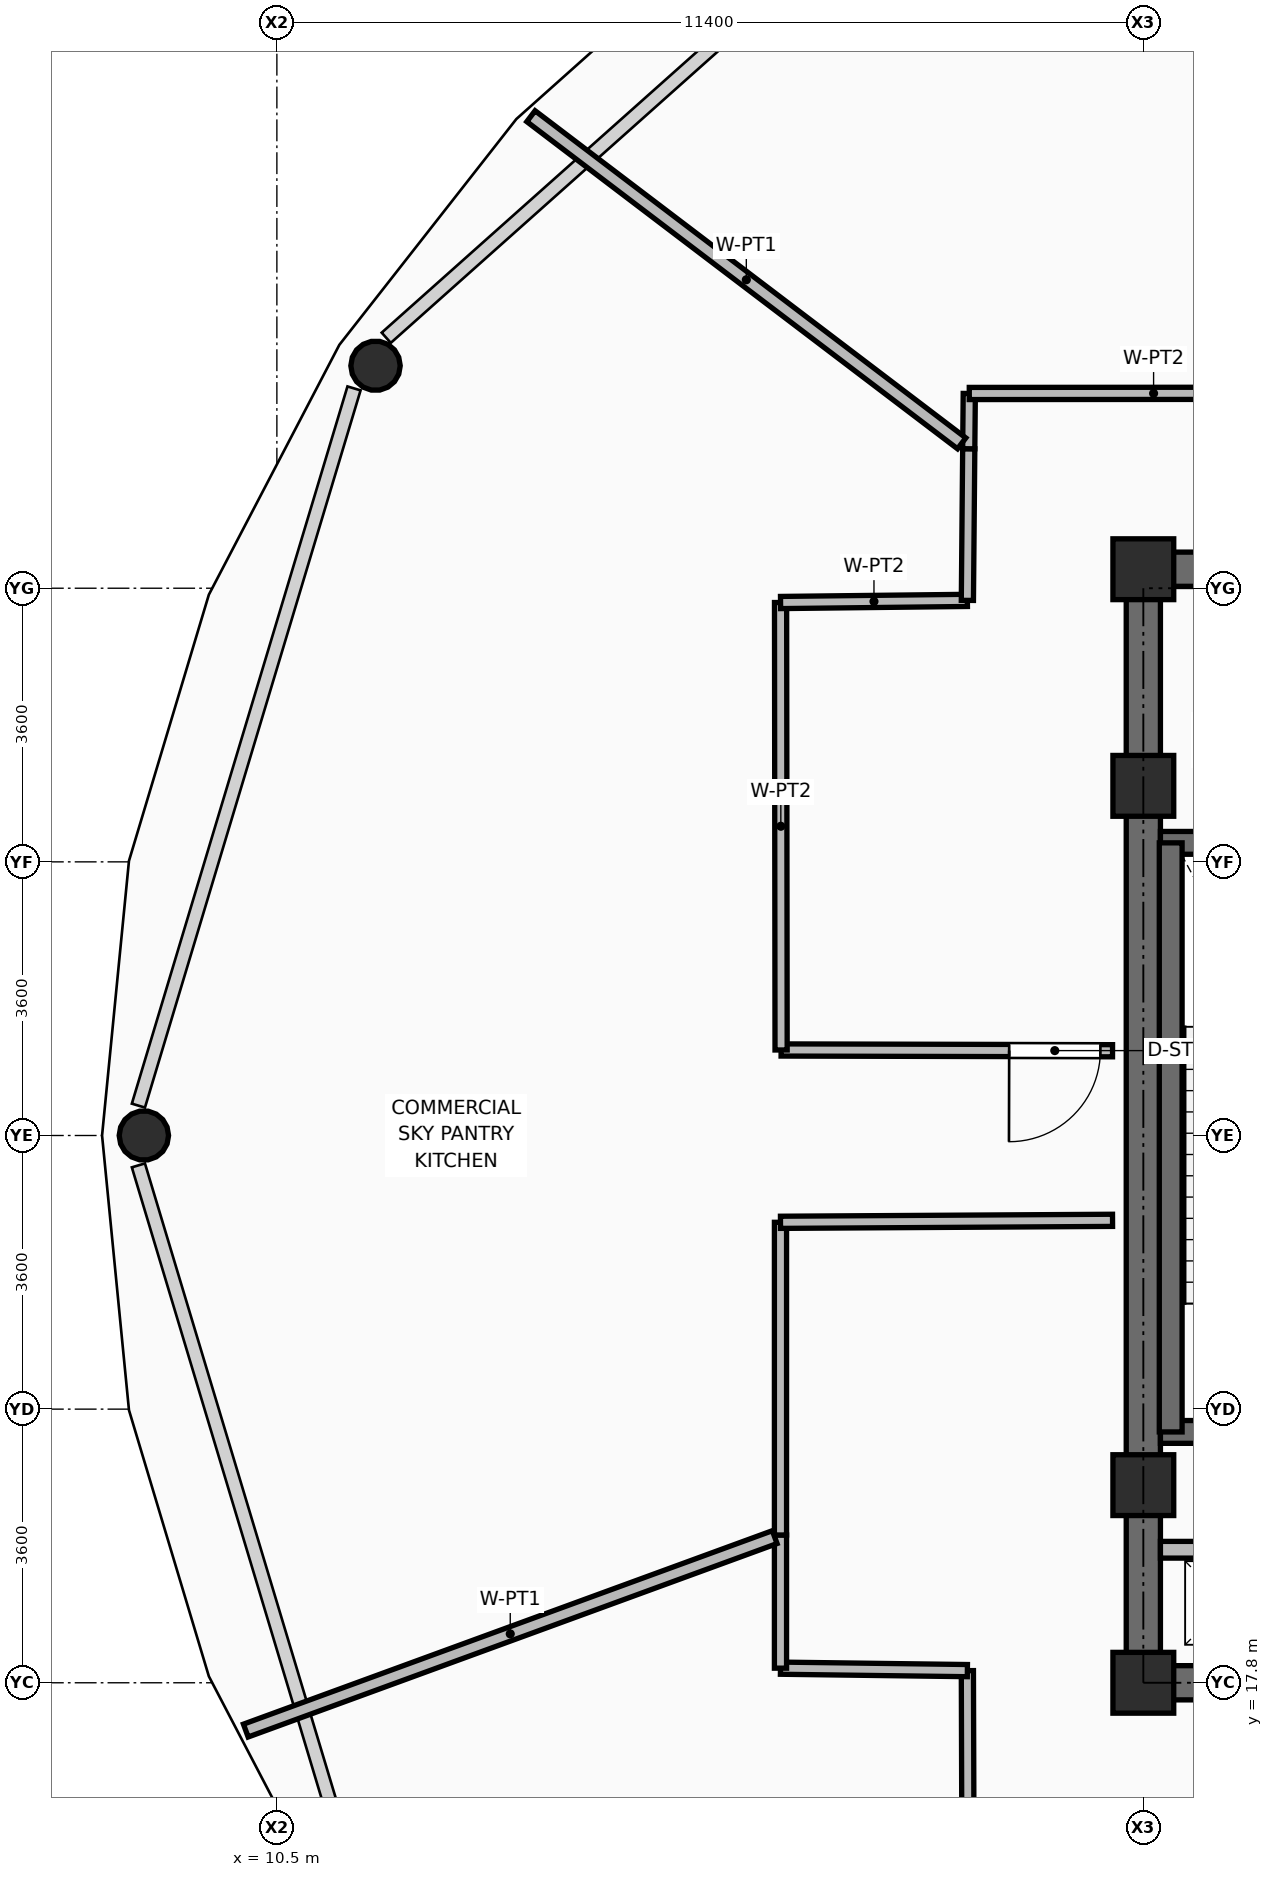
"""IFC4 building model, lengths in metres.
Left out: names, types, materials, properties, quantities, classifications, styles, units other than length and angle.
Written with IfcOpenShell. Run it as: python <this file> out.ifc"""

import sys

from ifc_helpers import new_model, si_unit, direction, frame, frame_2d, origin, origin_2d, place, context, subcontext, project, spatial, rectangle, hollow_circle, extrude, element, fill, save


model = new_model("IFC4")
c1 = context("Model", 3, precision=1e-05, world=origin(), true_north=direction((0.0, 1.0)))
c2 = subcontext(c1, "Body", "Model", "MODEL_VIEW")
j1 = project(units=[si_unit("LENGTHUNIT", "METRE"), si_unit("PLANEANGLEUNIT", "RADIAN")], contexts=[c1])
p1 = place(None, origin())
s1 = spatial("IfcSite", under=j1, at=p1, CompositionType="ELEMENT")
p2 = place(p1, origin())
s2 = spatial("IfcBuilding", under=s1, at=p2, CompositionType="ELEMENT")
p3 = place(p2, frame((0.0, 0.0, 181.35)))
s3 = spatial("IfcBuildingStorey", under=s2, at=p3, CompositionType="ELEMENT", Elevation=181.35)
for number, where, z_axis, x_axis in (
    (1, (21.9, 17.8, 0.0), (0.0, 0.0, 1.0), (1.0, 0.0, 0.0)),
    (2, (21.9, 20.4, 0.0), (0.0, 0.0, 1.0), (1.0, 0.0, 0.0)),
    (3, (21.9, 29.6, 0.0), (0.0, 0.0, 1.0), (1.0, 0.0, 0.0)),
    (4, (21.9, 32.45, 0.0), (0.0, 0.0, 1.0), (1.0, 0.0, 0.0)),
):
    element("IfcColumn", number, at=place(p3, frame(where, z_axis=z_axis, x_axis=x_axis)), inside=s3, PredefinedType="COLUMN", context=c2, shape_type="SweptSolid", body=[
        extrude(rectangle(XDim=0.8, YDim=0.8, at=origin_2d()), origin(), (0.0, 0.0, 1.0), 4.8),
    ])
for number, where, z_axis, x_axis in (
    (5, (11.798, 35.127, 0.0), (0.014, -0.007, 1.0), (0.458, 0.889, 0.0)),
    (6, (8.75, 25.0, 0.0), (0.016, 0.0, 1.0), (0.0, 1.0, 0.0)),
):
    element("IfcColumn", number, at=place(p3, frame(where, z_axis=z_axis, x_axis=x_axis)), inside=s3, PredefinedType="COLUMN", context=c2, shape_type="SweptSolid", body=[
        extrude(hollow_circle(Radius=0.325, WallThickness=0.03, at=origin_2d()), origin(), (0.0, 0.0, 1.0), 4.62),
    ])
p4 = place(p3, frame((21.675, 17.8, 0.0), z_axis=(0.0, 0.0, 1.0), x_axis=(1.0, 0.0, 0.0)))
e7 = element("IfcWall", 7, at=p4, inside=s3, PredefinedType="SHEAR", context=c2, shape_type="SweptSolid", body=[
    extrude(rectangle(XDim=2.075, YDim=0.45, at=frame_2d((1.038, 0.0))), origin(), (0.0, 0.0, 1.0), 4.62),
])
p5 = place(p3, frame((21.675, 32.45, 0.0), z_axis=(0.0, 0.0, 1.0), x_axis=(1.0, 0.0, 0.0)))
e8 = element("IfcWall", 8, at=p5, inside=s3, PredefinedType="SHEAR", context=c2, shape_type="SweptSolid", body=[
    extrude(rectangle(XDim=19.65, YDim=0.45, at=frame_2d((9.825, 0.0))), origin(), (0.0, 0.0, 1.0), 4.62),
])
p6 = place(p5, frame((2.075, 0.0, 0.0)))
e9 = element("IfcOpeningElement", 9, at=p6, cuts=e8, PredefinedType="OPENING", context=c2, shape_type="SweptSolid", body=[
    extrude(rectangle(XDim=1.1, YDim=2.1, at=frame_2d((0.55, 1.05))), frame((0.0, 0.235, 0.0), z_axis=(0.0, -1.0, 0.0), x_axis=(1.0, 0.0, 0.0)), (0.0, 0.0, 1.0), 0.47),
])
p7 = place(p5, frame((15.465, 0.0, 0.0)))
e10 = element("IfcOpeningElement", 10, at=p7, cuts=e8, PredefinedType="OPENING", context=c2, shape_type="SweptSolid", body=[
    extrude(rectangle(XDim=1.0, YDim=2.1, at=frame_2d((0.5, 1.05))), frame((0.0, 0.235, 0.0), z_axis=(0.0, -1.0, 0.0), x_axis=(1.0, 0.0, 0.0)), (0.0, 0.0, 1.0), 0.47),
])
p8 = place(p5, frame((17.475, 0.0, 0.0)))
e11 = element("IfcOpeningElement", 11, at=p8, cuts=e8, PredefinedType="OPENING", context=c2, shape_type="SweptSolid", body=[
    extrude(rectangle(XDim=0.9, YDim=2.1, at=frame_2d((0.45, 1.05))), frame((0.0, 0.235, 0.0), z_axis=(0.0, -1.0, 0.0), x_axis=(1.0, 0.0, 0.0)), (0.0, 0.0, 1.0), 0.47),
])
p9 = place(p3, frame((21.9, 18.025, 0.0), z_axis=(0.0, 0.0, 1.0), x_axis=(0.0, 1.0, 0.0)))
e12 = element("IfcWall", 12, at=p9, inside=s3, PredefinedType="SHEAR", context=c2, shape_type="SweptSolid", body=[
    extrude(rectangle(XDim=14.2, YDim=0.45, at=frame_2d((7.1, 0.0))), origin(), (0.0, 0.0, 1.0), 4.62),
])
p10 = place(p3, frame((22.125, 21.1, 0.0), z_axis=(0.0, 0.0, 1.0), x_axis=(1.0, 0.0, 0.0)))
e13 = element("IfcWall", 13, at=p10, inside=s3, PredefinedType="SHEAR", context=c2, shape_type="SweptSolid", body=[
    extrude(rectangle(XDim=3.615, YDim=0.3, at=frame_2d((1.808, 0.0))), origin(), (0.0, 0.0, 1.0), 4.62),
])
p11 = place(p10, frame((2.095, 0.0, 0.0)))
e14 = element("IfcOpeningElement", 14, at=p11, cuts=e13, PredefinedType="OPENING", context=c2, shape_type="SweptSolid", body=[
    extrude(rectangle(XDim=1.05, YDim=2.1, at=frame_2d((0.525, 1.05))), frame((0.0, 0.16, 0.0), z_axis=(0.0, -1.0, 0.0), x_axis=(1.0, 0.0, 0.0)), (0.0, 0.0, 1.0), 0.32),
])
p12 = place(p3, frame((22.125, 28.85, 0.0), z_axis=(0.0, 0.0, 1.0), x_axis=(1.0, 0.0, 0.0)))
e15 = element("IfcWall", 15, at=p12, inside=s3, PredefinedType="SHEAR", context=c2, shape_type="SweptSolid", body=[
    extrude(rectangle(XDim=3.615, YDim=0.3, at=frame_2d((1.808, 0.0))), origin(), (0.0, 0.0, 1.0), 4.62),
])
p13 = place(p3, frame((22.26, 21.1, 0.0), z_axis=(0.0, 0.0, 1.0), x_axis=(0.0, 1.0, 0.0)))
e16 = element("IfcWall", 16, at=p13, inside=s3, PredefinedType="SHEAR", context=c2, shape_type="SweptSolid", body=[
    extrude(rectangle(XDim=7.75, YDim=0.3, at=frame_2d((3.875, 0.0))), origin(), (0.0, 0.0, 1.0), 4.62),
])
p14 = place(p3, frame((22.125, 19.55, 0.0), z_axis=(0.0, 0.0, 1.0), x_axis=(1.0, 0.0, 0.0)))
e17 = element("IfcWall", 17, at=p14, inside=s3, PredefinedType="PARTITIONING", context=c2, shape_type="SweptSolid", body=[
    extrude(rectangle(XDim=1.665, YDim=0.22, at=frame_2d((0.833, 0.0))), origin(), (0.0, 0.0, 1.0), 3.645),
])
p15 = place(p3, frame((21.495, 26.115, 0.0), z_axis=(0.0, 0.0, 1.0), x_axis=(-0.999997365931, 0.002295241113, 0.0)))
e18 = element("IfcWall", 18, at=p15, inside=s3, PredefinedType="PARTITIONING", context=c2, shape_type="SweptSolid", body=[
    extrude(rectangle(XDim=4.361, YDim=0.16, at=frame_2d((2.181, 0.0))), origin(), (0.0, 0.0, 1.0), 3.645),
])
p16 = place(p15, frame((0.16, 0.0, 0.0)))
e19 = element("IfcOpeningElement", 19, at=p16, cuts=e18, PredefinedType="OPENING", context=c2, shape_type="SweptSolid", body=[
    extrude(rectangle(XDim=1.2, YDim=2.1, at=frame_2d((0.6, 1.05))), frame((0.0, 0.09, 0.0), z_axis=(0.0, -1.0, 0.0), x_axis=(1.0, 0.0, 0.0)), (0.0, 0.0, 1.0), 0.18),
])
p17 = place(p3, frame((17.134, 26.125, 0.0), z_axis=(0.0, 0.0, 1.0), x_axis=(-0.001202669889, 0.999999276792, 0.0)))
e20 = element("IfcWall", 20, at=p17, inside=s3, PredefinedType="PARTITIONING", context=c2, shape_type="SweptSolid", body=[
    extrude(rectangle(XDim=5.887, YDim=0.16, at=frame_2d((2.943, 0.0))), origin(), (0.0, 0.0, 1.0), 4.6),
])
p18 = place(p3, frame((17.127, 32.012, 0.0), z_axis=(0.0, 0.0, 1.0), x_axis=(0.999934771592, 0.011421583108, 0.0)))
e21 = element("IfcWall", 21, at=p18, inside=s3, PredefinedType="PARTITIONING", context=c2, shape_type="SweptSolid", body=[
    extrude(rectangle(XDim=2.458, YDim=0.16, at=frame_2d((1.229, 0.0))), origin(), (0.0, 0.0, 1.0), 4.6),
])
p19 = place(p3, frame((19.585, 32.04, 0.0), z_axis=(0.0, 0.0, 1.0), x_axis=(0.009056047668, 0.99995899316, 0.0)))
e22 = element("IfcWall", 22, at=p19, inside=s3, PredefinedType="PARTITIONING", context=c2, shape_type="SweptSolid", body=[
    extrude(rectangle(XDim=1.995, YDim=0.16, at=frame_2d((0.998, 0.0))), origin(), (0.0, 0.0, 1.0), 4.131),
])
p20 = place(p3, frame((19.603, 34.035, 0.0), z_axis=(0.0, 0.0, 1.0), x_axis=(0.009737617549, 0.999952588278, 0.0)))
e23 = element("IfcWall", 23, at=p20, inside=s3, PredefinedType="PARTITIONING", context=c2, shape_type="SweptSolid", body=[
    extrude(rectangle(XDim=0.727, YDim=0.16, at=frame_2d((0.364, 0.0))), origin(), (0.0, 0.0, 1.0), 4.6),
])
p21 = place(p3, frame((19.61, 34.762, 0.0), z_axis=(0.0, 0.0, 1.0), x_axis=(0.999999817545, 0.000604077413, 0.0)))
e24 = element("IfcWall", 24, at=p21, inside=s3, PredefinedType="PARTITIONING", context=c2, shape_type="SweptSolid", body=[
    extrude(rectangle(XDim=4.85, YDim=0.16, at=frame_2d((2.425, 0.0))), origin(), (0.0, 0.0, 1.0), 4.131),
])
p22 = place(p3, frame((19.603, 12.157, 0.0), z_axis=(0.0, 0.0, 1.0), x_axis=(-0.003113283747, 0.99999515372, 0.0)))
e25 = element("IfcWall", 25, at=p22, inside=s3, PredefinedType="PARTITIONING", context=c2, shape_type="SweptSolid", body=[
    extrude(rectangle(XDim=5.803, YDim=0.16, at=frame_2d((2.901, 0.0))), origin(), (0.0, 0.0, 1.0), 4.131),
])
p23 = place(p3, frame((19.585, 17.96, 0.0), z_axis=(0.0, 0.0, 1.0), x_axis=(-0.999915428104, 0.013005254277, 0.0)))
e26 = element("IfcWall", 26, at=p23, inside=s3, PredefinedType="PARTITIONING", context=c2, shape_type="SweptSolid", body=[
    extrude(rectangle(XDim=2.459, YDim=0.16, at=frame_2d((1.229, 0.0))), origin(), (0.0, 0.0, 1.0), 4.6),
])
p24 = place(p3, frame((17.126, 17.992, 0.0), z_axis=(0.0, 0.0, 1.0), x_axis=(0.0, 1.0, 0.0)))
e27 = element("IfcWall", 27, at=p24, inside=s3, PredefinedType="PARTITIONING", context=c2, shape_type="SweptSolid", body=[
    extrude(rectangle(XDim=1.752, YDim=0.16, at=frame_2d((0.876, 0.0))), origin(), (0.0, 0.0, 1.0), 4.6),
])
p25 = place(p3, frame((17.126, 19.744, 0.0), z_axis=(0.0, 0.0, 1.0), x_axis=(0.0, 1.0, 0.0)))
e28 = element("IfcWall", 28, at=p25, inside=s3, PredefinedType="PARTITIONING", context=c2, shape_type="SweptSolid", body=[
    extrude(rectangle(XDim=4.114, YDim=0.16, at=frame_2d((2.057, 0.0))), origin(), (0.0, 0.0, 1.0), 4.131),
])
p26 = place(p3, frame((17.126, 23.858, 0.0), z_axis=(0.0, 0.0, 1.0), x_axis=(0.99998212632, 0.005978882852, 0.0)))
e29 = element("IfcWall", 29, at=p26, inside=s3, PredefinedType="PARTITIONING", context=c2, shape_type="SweptSolid", body=[
    extrude(rectangle(XDim=4.369, YDim=0.16, at=frame_2d((2.185, 0.0))), origin(), (0.0, 0.0, 1.0), 3.645),
])
p27 = place(p3, frame((19.51, 34.106, 0.0), z_axis=(0.0, 0.0, 1.0), x_axis=(-0.796362467369, 0.60481965954, 0.0)))
e30 = element("IfcWall", 30, at=p27, inside=s3, PredefinedType="PARTITIONING", context=c2, shape_type="SweptSolid", body=[
    extrude(rectangle(XDim=7.116, YDim=0.18, at=frame_2d((3.558, 0.0))), origin(), (0.0, 0.0, 1.0), 3.975),
])
p28 = place(p3, frame((17.05, 19.716, 0.0), z_axis=(0.0, 0.0, 1.0), x_axis=(-0.939157852636, -0.343485848082, 0.0)))
e31 = element("IfcWall", 31, at=p28, inside=s3, PredefinedType="PARTITIONING", context=c2, shape_type="SweptSolid", body=[
    extrude(rectangle(XDim=7.41, YDim=0.18, at=frame_2d((3.705, 0.0))), origin(), (0.0, 0.0, 1.0), 3.975),
])
p29 = place(p16, origin())
e32 = element("IfcDoor", 32, at=p29, inside=s3, OperationType="SINGLE_SWING_RIGHT", PredefinedType="DOOR", context=c2, shape_type="SweptSolid", body=[
    extrude(rectangle(XDim=1.2, YDim=2.1, at=frame_2d((0.6, 1.05))), frame((0.0, 0.025, 0.0), z_axis=(0.0, -1.0, 0.0), x_axis=(1.0, 0.0, 0.0)), (0.0, 0.0, 1.0), 0.05),
])
fill(e19, e32)
save(model, sys.argv[1])
